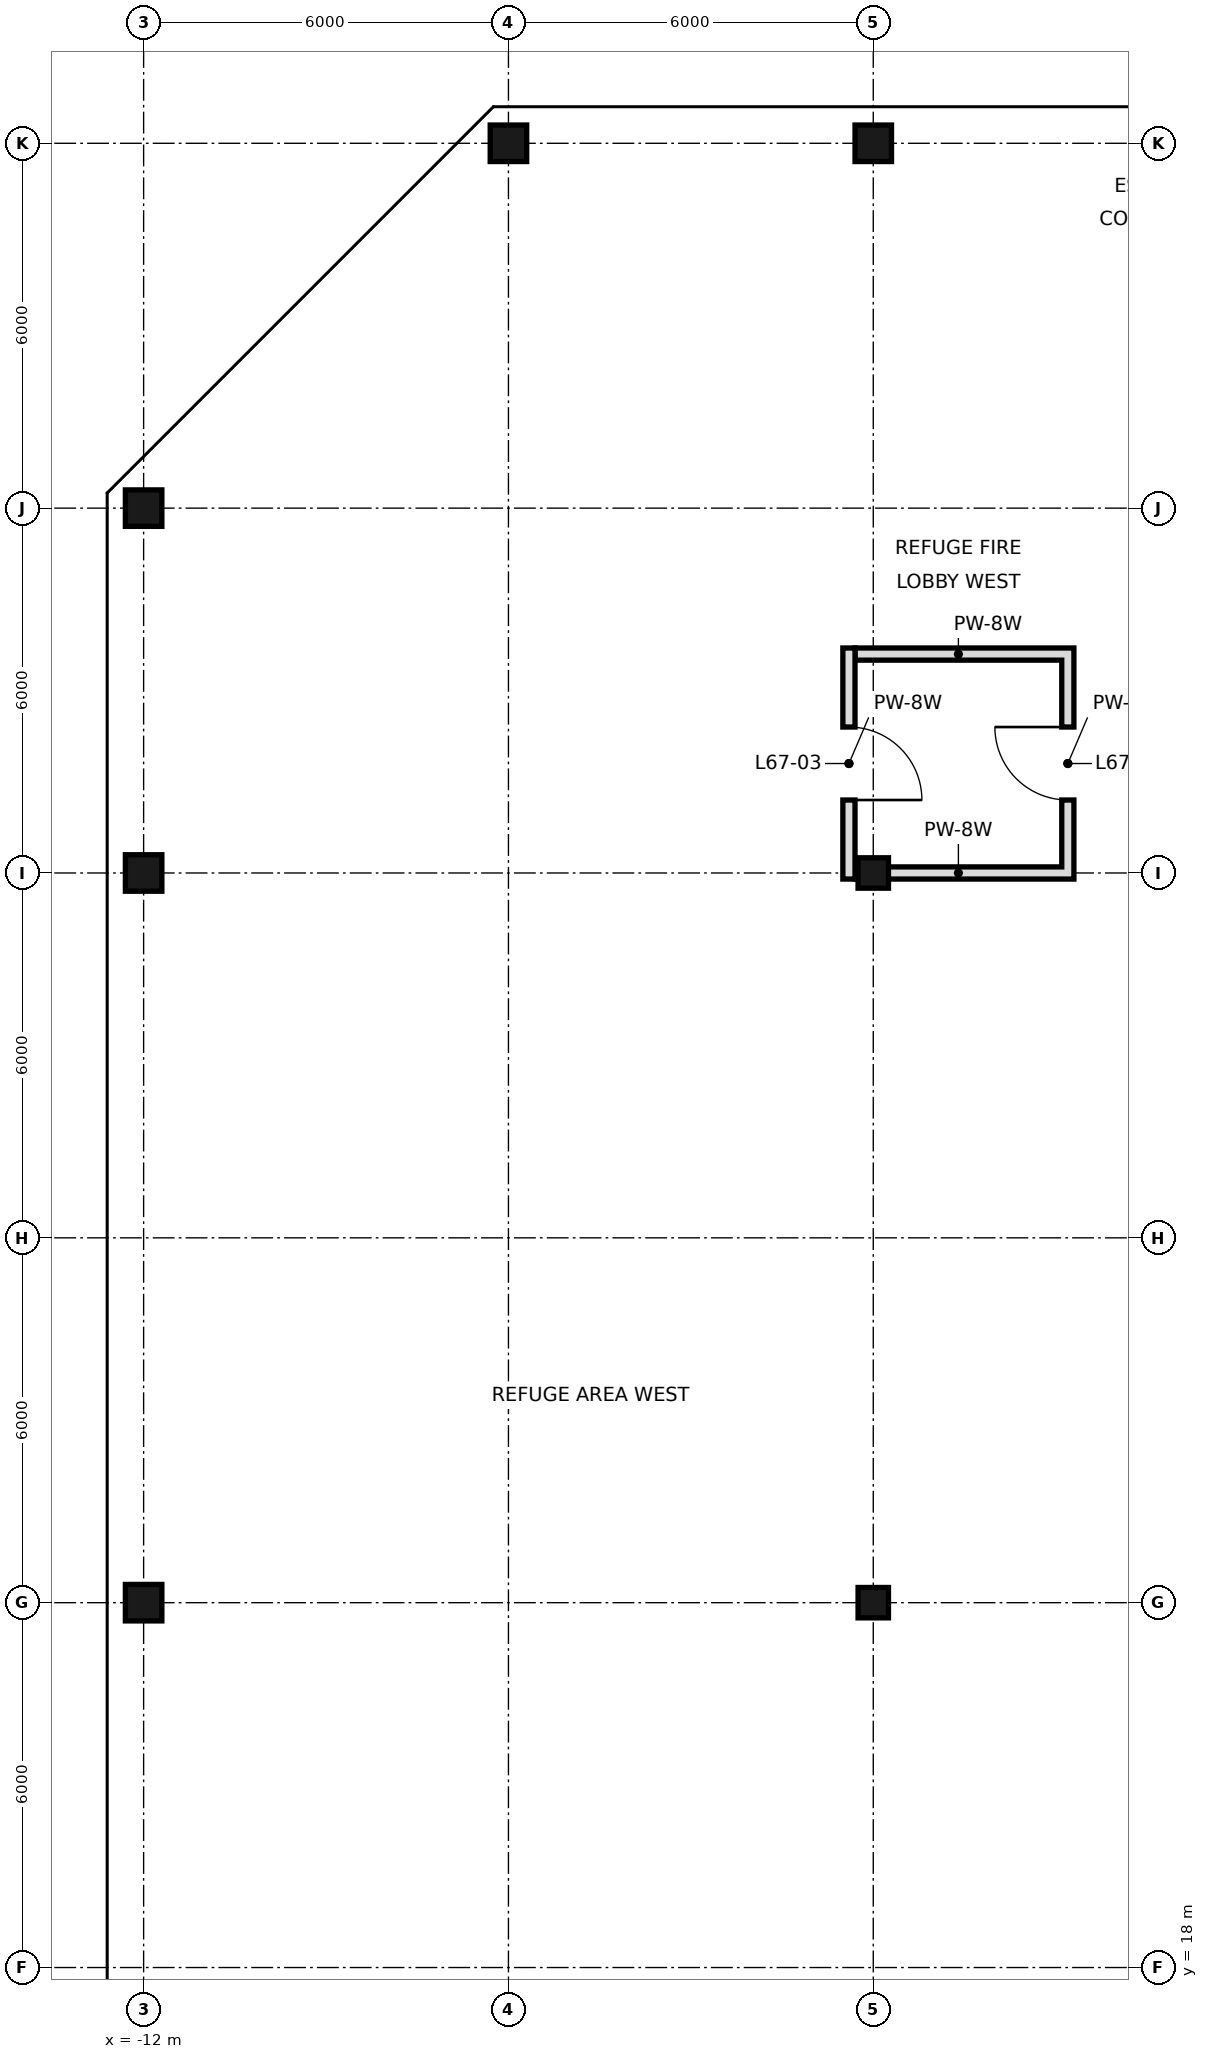
"""IFC4 building model, lengths in metres.
Left out: names, types, materials, properties, quantities, classifications, styles, units other than length and angle.
Written with IfcOpenShell. Run it as: python <this file> out.ifc"""

import sys

from ifc_helpers import new_model, si_unit, direction, frame, frame_2d, origin, origin_2d, place, context, subcontext, project, spatial, rectangle, hollow_rectangle, extrude, element, fill, save


model = new_model("IFC4")
c1 = context("Model", 3, precision=1e-05, world=origin(), true_north=direction((0.0, 1.0)))
c2 = subcontext(c1, "Body", "Model", "MODEL_VIEW")
j1 = project(units=[si_unit("LENGTHUNIT", "METRE"), si_unit("PLANEANGLEUNIT", "RADIAN")], contexts=[c1])
p1 = place(None, origin())
s1 = spatial("IfcSite", under=j1, at=p1, CompositionType="ELEMENT")
p2 = place(p1, origin())
s2 = spatial("IfcBuilding", under=s1, at=p2, CompositionType="ELEMENT")
p3 = place(p2, frame((0.0, 0.0, 281.8)))
s3 = spatial("IfcBuildingStorey", under=s2, at=p3, CompositionType="ELEMENT", Elevation=281.8)
for number, where, z_axis, x_axis in (
    (1, (-12.0, 24.0, 0.0), (0.0, 0.0, 1.0), (1.0, 0.0, 0.0)),
    (2, (-12.0, 36.0, 0.0), (0.0, 0.0, 1.0), (1.0, 0.0, 0.0)),
):
    element("IfcColumn", number, at=place(p3, frame(where, z_axis=z_axis, x_axis=x_axis)), inside=s3, PredefinedType="COLUMN", context=c2, shape_type="SweptSolid", body=[
        extrude(hollow_rectangle(XDim=0.6, YDim=0.6, WallThickness=0.028, at=origin_2d()), origin(), (0.0, 0.0, 1.0), 9.0),
    ])
for number, where, z_axis, x_axis in (
    (3, (-12.0, 42.0, 0.0), (0.0, 0.0, 1.0), (1.0, 0.0, 0.0)),
    (4, (-6.0, 48.0, 0.0), (0.0, 0.0, 1.0), (1.0, 0.0, 0.0)),
):
    element("IfcColumn", number, at=place(p3, frame(where, z_axis=z_axis, x_axis=x_axis)), inside=s3, PredefinedType="COLUMN", context=c2, shape_type="SweptSolid", body=[
        extrude(hollow_rectangle(XDim=0.6, YDim=0.6, WallThickness=0.028, at=origin_2d()), origin(), (0.0, 0.0, 1.0), 8.7),
    ])
for number, where, z_axis, x_axis in (
    (5, (0.0, 24.0, 0.0), (0.0, 0.0, 1.0), (1.0, 0.0, 0.0)),
    (6, (0.0, 36.0, 0.0), (0.0, 0.0, 1.0), (1.0, 0.0, 0.0)),
):
    element("IfcColumn", number, at=place(p3, frame(where, z_axis=z_axis, x_axis=x_axis)), inside=s3, PredefinedType="COLUMN", context=c2, shape_type="SweptSolid", body=[
        extrude(hollow_rectangle(XDim=0.5, YDim=0.5, WallThickness=0.025, at=origin_2d()), origin(), (0.0, 0.0, 1.0), 9.0),
    ])
p4 = place(p3, frame((0.0, 48.0, 0.0), z_axis=(0.0, 0.0, 1.0), x_axis=(1.0, 0.0, 0.0)))
e7 = element("IfcColumn", 7, at=p4, inside=s3, PredefinedType="COLUMN", context=c2, shape_type="SweptSolid", body=[
    extrude(hollow_rectangle(XDim=0.6, YDim=0.6, WallThickness=0.028, at=origin_2d()), origin(), (0.0, 0.0, 1.0), 9.0),
])
p5 = place(p3, frame((-0.4, 35.9, 0.0), z_axis=(0.0, 0.0, 1.0), x_axis=(0.0, 1.0, 0.0)))
e8 = element("IfcWall", 8, at=p5, inside=s3, PredefinedType="SOLIDWALL", context=c2, shape_type="SweptSolid", body=[
    extrude(rectangle(XDim=3.8, YDim=0.2, at=frame_2d((1.9, 0.0))), origin(), (0.0, 0.0, 1.0), 8.7),
])
p6 = place(p5, frame((1.3, 0.0, 0.0)))
e9 = element("IfcOpeningElement", 9, at=p6, cuts=e8, PredefinedType="OPENING", context=c2, shape_type="SweptSolid", body=[
    extrude(rectangle(XDim=1.2, YDim=2.4, at=frame_2d((0.6, 1.2))), frame((0.0, 0.11, 0.0), z_axis=(0.0, -1.0, 0.0), x_axis=(1.0, 0.0, 0.0)), (0.0, 0.0, 1.0), 0.22),
])
p7 = place(p3, frame((3.2, 35.9, 0.0), z_axis=(0.0, 0.0, 1.0), x_axis=(0.0, 1.0, 0.0)))
e10 = element("IfcWall", 10, at=p7, inside=s3, PredefinedType="SOLIDWALL", context=c2, shape_type="SweptSolid", body=[
    extrude(rectangle(XDim=3.8, YDim=0.2, at=frame_2d((1.9, 0.0))), origin(), (0.0, 0.0, 1.0), 8.7),
])
p8 = place(p7, frame((1.3, 0.0, 0.0)))
e11 = element("IfcOpeningElement", 11, at=p8, cuts=e10, PredefinedType="OPENING", context=c2, shape_type="SweptSolid", body=[
    extrude(rectangle(XDim=1.2, YDim=2.4, at=frame_2d((0.6, 1.2))), frame((0.0, 0.11, 0.0), z_axis=(0.0, -1.0, 0.0), x_axis=(1.0, 0.0, 0.0)), (0.0, 0.0, 1.0), 0.22),
])
p9 = place(p3, frame((-0.3, 36.0, 0.0), z_axis=(0.0, 0.0, 1.0), x_axis=(1.0, 0.0, 0.0)))
e12 = element("IfcWall", 12, at=p9, inside=s3, PredefinedType="SOLIDWALL", context=c2, shape_type="SweptSolid", body=[
    extrude(rectangle(XDim=3.4, YDim=0.2, at=frame_2d((1.7, 0.0))), origin(), (0.0, 0.0, 1.0), 8.7),
])
p10 = place(p3, frame((-0.3, 39.6, 0.0), z_axis=(0.0, 0.0, 1.0), x_axis=(1.0, 0.0, 0.0)))
e13 = element("IfcWall", 13, at=p10, inside=s3, PredefinedType="SOLIDWALL", context=c2, shape_type="SweptSolid", body=[
    extrude(rectangle(XDim=3.4, YDim=0.2, at=frame_2d((1.7, 0.0))), origin(), (0.0, 0.0, 1.0), 8.0),
])
p11 = place(p6, frame((1.2, 0.0, 0.0), z_axis=(0.0, 0.0, 1.0), x_axis=(-1.0, 0.0, 0.0)))
e14 = element("IfcDoor", 14, at=p11, inside=s3, OperationType="SINGLE_SWING_RIGHT", PredefinedType="DOOR", context=c2, shape_type="SweptSolid", body=[
    extrude(rectangle(XDim=1.2, YDim=2.4, at=frame_2d((0.6, 1.2))), frame((0.0, 0.025, 0.0), z_axis=(0.0, -1.0, 0.0), x_axis=(1.0, 0.0, 0.0)), (0.0, 0.0, 1.0), 0.05),
])
fill(e9, e14)
p12 = place(p8, frame((1.2, 0.0, 0.0), z_axis=(0.0, 0.0, 1.0), x_axis=(-1.0, 0.0, 0.0)))
e15 = element("IfcDoor", 15, at=p12, inside=s3, OperationType="SINGLE_SWING_LEFT", PredefinedType="DOOR", context=c2, shape_type="SweptSolid", body=[
    extrude(rectangle(XDim=1.2, YDim=2.4, at=frame_2d((0.6, 1.2))), frame((0.0, 0.025, 0.0), z_axis=(0.0, -1.0, 0.0), x_axis=(1.0, 0.0, 0.0)), (0.0, 0.0, 1.0), 0.05),
])
fill(e11, e15)
save(model, sys.argv[1])
